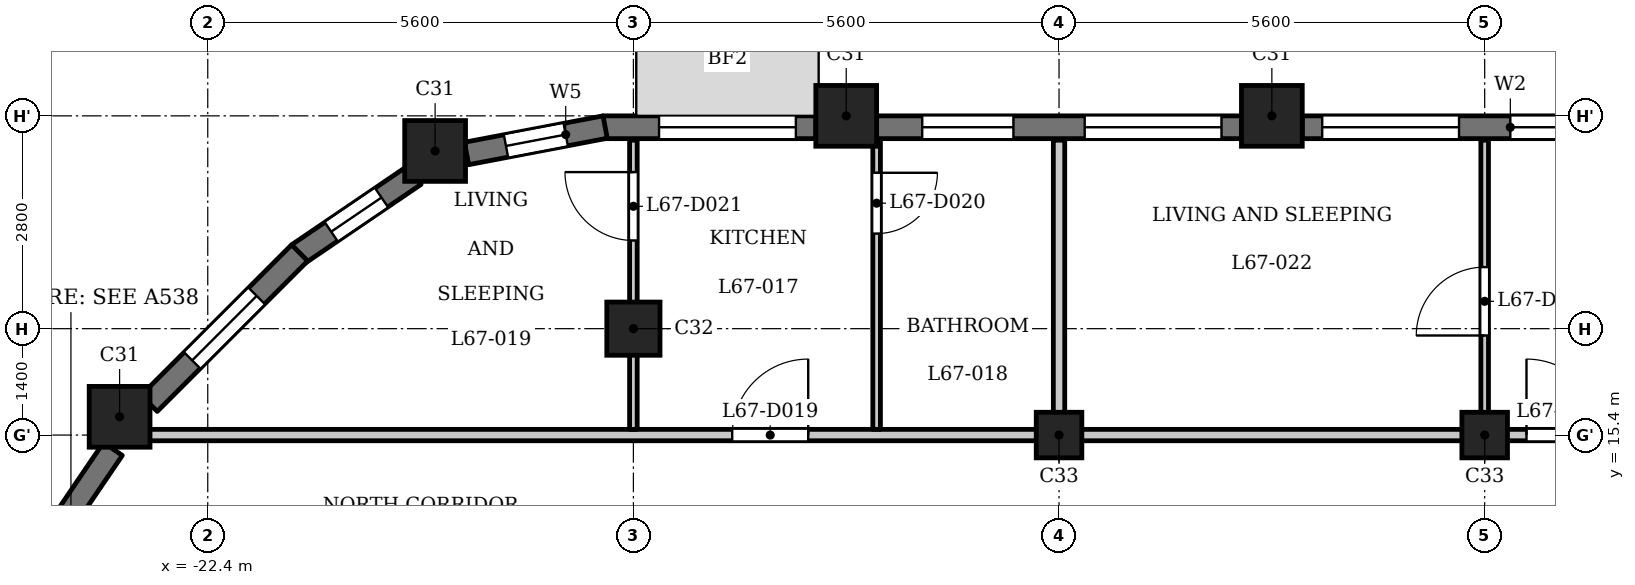
"""IFC4 building model, lengths in metres.
Left out: names, types, materials, properties, quantities, classifications, styles, units other than length and angle.
Written with IfcOpenShell. Run it as: python <this file> out.ifc"""

import sys

from ifc_helpers import new_model, si_unit, direction, frame, frame_2d, origin, origin_2d, place, context, subcontext, project, spatial, rectangle, extrude, element, fill, save


model = new_model("IFC4")
c1 = context("Model", 3, precision=1e-05, world=origin(), true_north=direction((0.0, 1.0)))
c2 = subcontext(c1, "Body", "Model", "MODEL_VIEW")
j1 = project(units=[si_unit("LENGTHUNIT", "METRE"), si_unit("PLANEANGLEUNIT", "RADIAN")], contexts=[c1])
p1 = place(None, origin())
s1 = spatial("IfcSite", under=j1, at=p1, CompositionType="ELEMENT")
p2 = place(p1, origin())
s2 = spatial("IfcBuilding", under=s1, at=p2, CompositionType="ELEMENT")
p3 = place(p2, frame((0.0, 0.0, 259.2)))
s3 = spatial("IfcBuildingStorey", under=s2, at=p3, CompositionType="ELEMENT", Elevation=259.2)
for number, where, z_axis, x_axis in (
    (1, (-8.4, 19.6, 0.0), (0.0, 0.0, 1.0), (1.0, 0.0, 0.0)),
    (2, (-14.0, 19.6, 0.0), (0.0, 0.0, 1.0), (1.0, 0.0, 0.0)),
    (3, (-19.409, 19.138, 0.0), (0.0, 0.0, 1.0), (1.0, 0.0, 0.0)),
    (4, (-23.56, 15.64, 0.0), (0.0, 0.0, 1.0), (1.0, 0.0, 0.0)),
):
    element("IfcColumn", number, at=place(p3, frame(where, z_axis=z_axis, x_axis=x_axis)), inside=s3, PredefinedType="COLUMN", context=c2, shape_type="SweptSolid", body=[
        extrude(rectangle(XDim=0.8, YDim=0.8, at=origin_2d()), origin(), (0.0, 0.0, 1.0), 3.5),
    ])
p4 = place(p3, frame((-16.8, 16.8, 0.0), z_axis=(0.0, 0.0, 1.0), x_axis=(1.0, 0.0, 0.0)))
e5 = element("IfcColumn", 5, at=p4, inside=s3, PredefinedType="COLUMN", context=c2, shape_type="SweptSolid", body=[
    extrude(rectangle(XDim=0.7, YDim=0.7, at=origin_2d()), origin(), (0.0, 0.0, 1.0), 3.5),
])
for number, where, z_axis, x_axis in (
    (6, (-11.2, 15.4, 0.0), (0.0, 0.0, 1.0), (1.0, 0.0, 0.0)),
    (7, (-5.6, 15.4, 0.0), (0.0, 0.0, 1.0), (1.0, 0.0, 0.0)),
):
    element("IfcColumn", number, at=place(p3, frame(where, z_axis=z_axis, x_axis=x_axis)), inside=s3, PredefinedType="COLUMN", context=c2, shape_type="SweptSolid", body=[
        extrude(rectangle(XDim=0.6, YDim=0.6, at=origin_2d()), origin(), (0.0, 0.0, 1.0), 3.5),
    ])
p5 = place(p3, frame((-3.2, 19.45, 0.0), z_axis=(0.0, 0.0, 1.0), x_axis=(-1.0, 0.0, 0.0)))
e8 = element("IfcWall", 8, at=p5, inside=s3, PredefinedType="SOLIDWALL", context=c2, shape_type="SweptSolid", body=[
    extrude(rectangle(XDim=4.8, YDim=0.3, at=frame_2d((2.4, 0.0))), origin(), (0.0, 0.0, 1.0), 2.55),
])
p6 = place(p5, frame((0.262, 0.0, 0.9)))
e9 = element("IfcOpeningElement", 9, at=p6, cuts=e8, PredefinedType="OPENING", context=c2, shape_type="SweptSolid", body=[
    extrude(rectangle(XDim=1.8, YDim=1.25, at=frame_2d((0.9, 0.625))), frame((0.0, 0.16, 0.0), z_axis=(0.0, -1.0, 0.0), x_axis=(1.0, 0.0, 0.0)), (0.0, 0.0, 1.0), 0.32),
])
p7 = place(p5, frame((2.738, 0.0, 0.9)))
e10 = element("IfcOpeningElement", 10, at=p7, cuts=e8, PredefinedType="OPENING", context=c2, shape_type="SweptSolid", body=[
    extrude(rectangle(XDim=1.8, YDim=1.25, at=frame_2d((0.9, 0.625))), frame((0.0, 0.16, 0.0), z_axis=(0.0, -1.0, 0.0), x_axis=(1.0, 0.0, 0.0)), (0.0, 0.0, 1.0), 0.32),
])
p8 = place(p3, frame((-8.8, 19.45, 0.0), z_axis=(0.0, 0.0, 1.0), x_axis=(-1.0, 0.0, 0.0)))
e11 = element("IfcWall", 11, at=p8, inside=s3, PredefinedType="SOLIDWALL", context=c2, shape_type="SweptSolid", body=[
    extrude(rectangle(XDim=4.8, YDim=0.3, at=frame_2d((2.4, 0.0))), origin(), (0.0, 0.0, 1.0), 2.55),
])
p9 = place(p8, frame((0.262, 0.0, 0.9)))
e12 = element("IfcOpeningElement", 12, at=p9, cuts=e11, PredefinedType="OPENING", context=c2, shape_type="SweptSolid", body=[
    extrude(rectangle(XDim=1.8, YDim=1.25, at=frame_2d((0.9, 0.625))), frame((0.0, 0.16, 0.0), z_axis=(0.0, -1.0, 0.0), x_axis=(1.0, 0.0, 0.0)), (0.0, 0.0, 1.0), 0.32),
])
p10 = place(p8, frame((3.0, 0.0, 0.6)))
e13 = element("IfcOpeningElement", 13, at=p10, cuts=e11, PredefinedType="OPENING", context=c2, shape_type="SweptSolid", body=[
    extrude(rectangle(XDim=1.2, YDim=1.55, at=frame_2d((0.6, 0.775))), frame((0.0, 0.16, 0.0), z_axis=(0.0, -1.0, 0.0), x_axis=(1.0, 0.0, 0.0)), (0.0, 0.0, 1.0), 0.32),
])
p11 = place(p3, frame((-14.4, 19.45, 0.0), z_axis=(0.0, 0.0, 1.0), x_axis=(-1.0, 0.0, 0.0)))
e14 = element("IfcWall", 14, at=p11, inside=s3, PredefinedType="SOLIDWALL", context=c2, shape_type="SweptSolid", body=[
    extrude(rectangle(XDim=2.8, YDim=0.3, at=frame_2d((1.4, 0.0))), origin(), (0.0, 0.0, 1.0), 2.55),
])
p12 = place(p11, frame((0.262, 0.0, 0.9)))
e15 = element("IfcOpeningElement", 15, at=p12, cuts=e14, PredefinedType="OPENING", context=c2, shape_type="SweptSolid", body=[
    extrude(rectangle(XDim=1.8, YDim=1.25, at=frame_2d((0.9, 0.625))), frame((0.0, 0.16, 0.0), z_axis=(0.0, -1.0, 0.0), x_axis=(1.0, 0.0, 0.0)), (0.0, 0.0, 1.0), 0.32),
])
p13 = place(p3, frame((-17.172, 19.453, 0.0), z_axis=(0.0, 0.0, 1.0), x_axis=(-0.982301706131, -0.187305520826, 0.0)))
e16 = element("IfcWall", 16, at=p13, inside=s3, PredefinedType="SOLIDWALL", context=c2, shape_type="SweptSolid", body=[
    extrude(rectangle(XDim=1.856, YDim=0.3, at=frame_2d((0.928, 0.0))), origin(), (0.0, 0.0, 1.0), 2.55),
])
p14 = place(p13, frame((0.528, 0.0, 0.6)))
e17 = element("IfcOpeningElement", 17, at=p14, cuts=e16, PredefinedType="OPENING", context=c2, shape_type="SweptSolid", body=[
    extrude(rectangle(XDim=0.8, YDim=1.55, at=frame_2d((0.4, 0.775))), frame((0.0, 0.16, 0.0), z_axis=(0.0, -1.0, 0.0), x_axis=(1.0, 0.0, 0.0)), (0.0, 0.0, 1.0), 0.32),
])
p15 = place(p3, frame((-19.678, 18.822, 0.0), z_axis=(0.0, 0.0, 1.0), x_axis=(-0.826997446962, -0.562205676526, 0.0)))
e18 = element("IfcWall", 18, at=p15, inside=s3, PredefinedType="SOLIDWALL", context=c2, shape_type="SweptSolid", body=[
    extrude(rectangle(XDim=1.856, YDim=0.3, at=frame_2d((0.928, 0.0))), origin(), (0.0, 0.0, 1.0), 2.55),
])
p16 = place(p15, frame((0.528, 0.0, 0.6)))
e19 = element("IfcOpeningElement", 19, at=p16, cuts=e18, PredefinedType="OPENING", context=c2, shape_type="SweptSolid", body=[
    extrude(rectangle(XDim=0.8, YDim=1.55, at=frame_2d((0.4, 0.775))), frame((0.0, 0.16, 0.0), z_axis=(0.0, -1.0, 0.0), x_axis=(1.0, 0.0, 0.0)), (0.0, 0.0, 1.0), 0.32),
])
p17 = place(p3, frame((-21.191, 17.797, 0.0), z_axis=(0.0, 0.0, 1.0), x_axis=(-0.707106781187, -0.707106781187, 0.0)))
e20 = element("IfcWall", 20, at=p17, inside=s3, PredefinedType="SOLIDWALL", context=c2, shape_type="SweptSolid", body=[
    extrude(rectangle(XDim=2.8, YDim=0.3, at=frame_2d((1.4, 0.0))), origin(), (0.0, 0.0, 1.0), 2.55),
])
p18 = place(p17, frame((0.8, 0.0, 0.6)))
e21 = element("IfcOpeningElement", 21, at=p18, cuts=e20, PredefinedType="OPENING", context=c2, shape_type="SweptSolid", body=[
    extrude(rectangle(XDim=1.2, YDim=1.55, at=frame_2d((0.6, 0.775))), frame((0.0, 0.16, 0.0), z_axis=(0.0, -1.0, 0.0), x_axis=(1.0, 0.0, 0.0)), (0.0, 0.0, 1.0), 0.32),
])
p19 = place(p3, frame((-23.648, 15.217, 0.0), z_axis=(0.0, 0.0, 1.0), x_axis=(-0.562043265151, -0.827107833416, 0.0)))
e22 = element("IfcWall", 22, at=p19, inside=s3, PredefinedType="SOLIDWALL", context=c2, shape_type="SweptSolid", body=[
    extrude(rectangle(XDim=1.377, YDim=0.3, at=frame_2d((0.688, 0.0))), origin(), (0.0, 0.0, 1.0), 2.55),
])
p20 = place(p3, frame((-23.55, 15.4, 0.0), z_axis=(0.0, 0.0, 1.0), x_axis=(1.0, 0.0, 0.0)))
e23 = element("IfcWall", 23, at=p20, inside=s3, PredefinedType="PARTITIONING", context=c2, shape_type="SweptSolid", body=[
    extrude(rectangle(XDim=46.872, YDim=0.15, at=frame_2d((23.436, 0.0))), origin(), (0.0, 0.0, 1.0), 3.2),
])
p21 = place(p20, frame((8.05, 0.0, 0.0)))
e24 = element("IfcOpeningElement", 24, at=p21, cuts=e23, PredefinedType="OPENING", context=c2, shape_type="SweptSolid", body=[
    extrude(rectangle(XDim=1.0, YDim=2.1, at=frame_2d((0.5, 1.05))), frame((0.0, 0.085, 0.0), z_axis=(0.0, -1.0, 0.0), x_axis=(1.0, 0.0, 0.0)), (0.0, 0.0, 1.0), 0.17),
])
p22 = place(p20, frame((18.5, 0.0, 0.0)))
e25 = element("IfcOpeningElement", 25, at=p22, cuts=e23, PredefinedType="OPENING", context=c2, shape_type="SweptSolid", body=[
    extrude(rectangle(XDim=1.0, YDim=2.1, at=frame_2d((0.5, 1.05))), frame((0.0, 0.085, 0.0), z_axis=(0.0, -1.0, 0.0), x_axis=(1.0, 0.0, 0.0)), (0.0, 0.0, 1.0), 0.17),
])
p23 = place(p20, frame((30.7, 0.0, 0.0)))
e26 = element("IfcOpeningElement", 26, at=p23, cuts=e23, PredefinedType="OPENING", context=c2, shape_type="SweptSolid", body=[
    extrude(rectangle(XDim=1.0, YDim=2.1, at=frame_2d((0.5, 1.05))), frame((0.0, 0.085, 0.0), z_axis=(0.0, -1.0, 0.0), x_axis=(1.0, 0.0, 0.0)), (0.0, 0.0, 1.0), 0.17),
])
p24 = place(p20, frame((37.7, 0.0, 0.0)))
e27 = element("IfcOpeningElement", 27, at=p24, cuts=e23, PredefinedType="OPENING", context=c2, shape_type="SweptSolid", body=[
    extrude(rectangle(XDim=1.0, YDim=2.1, at=frame_2d((0.5, 1.05))), frame((0.0, 0.085, 0.0), z_axis=(0.0, -1.0, 0.0), x_axis=(1.0, 0.0, 0.0)), (0.0, 0.0, 1.0), 0.17),
])
p25 = place(p3, frame((-16.8, 15.475, 0.0), z_axis=(0.0, 0.0, 1.0), x_axis=(0.0, 1.0, 0.0)))
e28 = element("IfcWall", 28, at=p25, inside=s3, PredefinedType="PARTITIONING", context=c2, shape_type="SweptSolid", body=[
    extrude(rectangle(XDim=3.805, YDim=0.1, at=frame_2d((1.902, 0.0))), origin(), (0.0, 0.0, 1.0), 3.2),
])
p26 = place(p25, frame((2.485, 0.0, 0.0)))
e29 = element("IfcOpeningElement", 29, at=p26, cuts=e28, PredefinedType="OPENING", context=c2, shape_type="SweptSolid", body=[
    extrude(rectangle(XDim=0.9, YDim=2.1, at=frame_2d((0.45, 1.05))), frame((0.0, 0.06, 0.0), z_axis=(0.0, -1.0, 0.0), x_axis=(1.0, 0.0, 0.0)), (0.0, 0.0, 1.0), 0.12),
])
p27 = place(p3, frame((-13.6, 15.475, 0.0), z_axis=(0.0, 0.0, 1.0), x_axis=(0.0, 1.0, 0.0)))
e30 = element("IfcWall", 30, at=p27, inside=s3, PredefinedType="PARTITIONING", context=c2, shape_type="SweptSolid", body=[
    extrude(rectangle(XDim=3.805, YDim=0.1, at=frame_2d((1.902, 0.0))), origin(), (0.0, 0.0, 1.0), 3.2),
])
p28 = place(p27, frame((2.576, 0.0, 0.0)))
e31 = element("IfcOpeningElement", 31, at=p28, cuts=e30, PredefinedType="OPENING", context=c2, shape_type="SweptSolid", body=[
    extrude(rectangle(XDim=0.8, YDim=2.1, at=frame_2d((0.4, 1.05))), frame((0.0, 0.06, 0.0), z_axis=(0.0, -1.0, 0.0), x_axis=(1.0, 0.0, 0.0)), (0.0, 0.0, 1.0), 0.12),
])
p29 = place(p3, frame((-11.2, 15.475, 0.0), z_axis=(0.0, 0.0, 1.0), x_axis=(0.0, 1.0, 0.0)))
e32 = element("IfcWall", 32, at=p29, inside=s3, PredefinedType="PARTITIONING", context=c2, shape_type="SweptSolid", body=[
    extrude(rectangle(XDim=3.805, YDim=0.15, at=frame_2d((1.902, 0.0))), origin(), (0.0, 0.0, 1.0), 3.2),
])
p30 = place(p3, frame((-5.6, 15.475, 0.0), z_axis=(0.0, 0.0, 1.0), x_axis=(0.0, 1.0, 0.0)))
e33 = element("IfcWall", 33, at=p30, inside=s3, PredefinedType="PARTITIONING", context=c2, shape_type="SweptSolid", body=[
    extrude(rectangle(XDim=3.805, YDim=0.1, at=frame_2d((1.902, 0.0))), origin(), (0.0, 0.0, 1.0), 3.2),
])
p31 = place(p30, frame((1.235, 0.0, 0.0)))
e34 = element("IfcOpeningElement", 34, at=p31, cuts=e33, PredefinedType="OPENING", context=c2, shape_type="SweptSolid", body=[
    extrude(rectangle(XDim=0.9, YDim=2.1, at=frame_2d((0.45, 1.05))), frame((0.0, 0.06, 0.0), z_axis=(0.0, -1.0, 0.0), x_axis=(1.0, 0.0, 0.0)), (0.0, 0.0, 1.0), 0.12),
])
p32 = place(p21, origin())
e35 = element("IfcDoor", 35, at=p32, inside=s3, OperationType="SINGLE_SWING_LEFT", PredefinedType="DOOR", context=c2, shape_type="SweptSolid", body=[
    extrude(rectangle(XDim=1.0, YDim=2.1, at=frame_2d((0.5, 1.05))), frame((0.0, 0.025, 0.0), z_axis=(0.0, -1.0, 0.0), x_axis=(1.0, 0.0, 0.0)), (0.0, 0.0, 1.0), 0.05),
])
fill(e24, e35)
p33 = place(p28, origin())
e36 = element("IfcDoor", 36, at=p33, inside=s3, OperationType="SINGLE_SWING_RIGHT", PredefinedType="DOOR", context=c2, shape_type="SweptSolid", body=[
    extrude(rectangle(XDim=0.8, YDim=2.1, at=frame_2d((0.4, 1.05))), frame((0.0, 0.025, 0.0), z_axis=(0.0, -1.0, 0.0), x_axis=(1.0, 0.0, 0.0)), (0.0, 0.0, 1.0), 0.05),
])
fill(e31, e36)
p34 = place(p26, origin())
e37 = element("IfcDoor", 37, at=p34, inside=s3, OperationType="SINGLE_SWING_LEFT", PredefinedType="DOOR", context=c2, shape_type="SweptSolid", body=[
    extrude(rectangle(XDim=0.9, YDim=2.1, at=frame_2d((0.45, 1.05))), frame((0.0, 0.025, 0.0), z_axis=(0.0, -1.0, 0.0), x_axis=(1.0, 0.0, 0.0)), (0.0, 0.0, 1.0), 0.05),
])
fill(e29, e37)
p35 = place(p22, origin())
e38 = element("IfcDoor", 38, at=p35, inside=s3, OperationType="SINGLE_SWING_RIGHT", PredefinedType="DOOR", context=c2, shape_type="SweptSolid", body=[
    extrude(rectangle(XDim=1.0, YDim=2.1, at=frame_2d((0.5, 1.05))), frame((0.0, 0.025, 0.0), z_axis=(0.0, -1.0, 0.0), x_axis=(1.0, 0.0, 0.0)), (0.0, 0.0, 1.0), 0.05),
])
fill(e25, e38)
p36 = place(p31, origin())
e39 = element("IfcDoor", 39, at=p36, inside=s3, OperationType="SINGLE_SWING_RIGHT", PredefinedType="DOOR", context=c2, shape_type="SweptSolid", body=[
    extrude(rectangle(XDim=0.9, YDim=2.1, at=frame_2d((0.45, 1.05))), frame((0.0, 0.025, 0.0), z_axis=(0.0, -1.0, 0.0), x_axis=(1.0, 0.0, 0.0)), (0.0, 0.0, 1.0), 0.05),
])
fill(e34, e39)
p37 = place(p6, origin())
e40 = element("IfcWindow", 40, at=p37, inside=s3, PartitioningType="SINGLE_PANEL", PredefinedType="WINDOW", context=c2, shape_type="SweptSolid", body=[
    extrude(rectangle(XDim=1.8, YDim=1.25, at=frame_2d((0.9, 0.625))), frame((0.0, 0.03, 0.0), z_axis=(0.0, -1.0, 0.0), x_axis=(1.0, 0.0, 0.0)), (0.0, 0.0, 1.0), 0.06),
])
fill(e9, e40)
p38 = place(p7, origin())
e41 = element("IfcWindow", 41, at=p38, inside=s3, PartitioningType="SINGLE_PANEL", PredefinedType="WINDOW", context=c2, shape_type="SweptSolid", body=[
    extrude(rectangle(XDim=1.8, YDim=1.25, at=frame_2d((0.9, 0.625))), frame((0.0, 0.03, 0.0), z_axis=(0.0, -1.0, 0.0), x_axis=(1.0, 0.0, 0.0)), (0.0, 0.0, 1.0), 0.06),
])
fill(e10, e41)
p39 = place(p9, origin())
e42 = element("IfcWindow", 42, at=p39, inside=s3, PartitioningType="SINGLE_PANEL", PredefinedType="WINDOW", context=c2, shape_type="SweptSolid", body=[
    extrude(rectangle(XDim=1.8, YDim=1.25, at=frame_2d((0.9, 0.625))), frame((0.0, 0.03, 0.0), z_axis=(0.0, -1.0, 0.0), x_axis=(1.0, 0.0, 0.0)), (0.0, 0.0, 1.0), 0.06),
])
fill(e12, e42)
p40 = place(p10, origin())
e43 = element("IfcWindow", 43, at=p40, inside=s3, PartitioningType="SINGLE_PANEL", PredefinedType="WINDOW", context=c2, shape_type="SweptSolid", body=[
    extrude(rectangle(XDim=1.2, YDim=1.55, at=frame_2d((0.6, 0.775))), frame((0.0, 0.03, 0.0), z_axis=(0.0, -1.0, 0.0), x_axis=(1.0, 0.0, 0.0)), (0.0, 0.0, 1.0), 0.06),
])
fill(e13, e43)
p41 = place(p12, origin())
e44 = element("IfcWindow", 44, at=p41, inside=s3, PartitioningType="SINGLE_PANEL", PredefinedType="WINDOW", context=c2, shape_type="SweptSolid", body=[
    extrude(rectangle(XDim=1.8, YDim=1.25, at=frame_2d((0.9, 0.625))), frame((0.0, 0.03, 0.0), z_axis=(0.0, -1.0, 0.0), x_axis=(1.0, 0.0, 0.0)), (0.0, 0.0, 1.0), 0.06),
])
fill(e15, e44)
p42 = place(p14, origin())
e45 = element("IfcWindow", 45, at=p42, inside=s3, PartitioningType="SINGLE_PANEL", PredefinedType="WINDOW", context=c2, shape_type="SweptSolid", body=[
    extrude(rectangle(XDim=0.8, YDim=1.55, at=frame_2d((0.4, 0.775))), frame((0.0, 0.03, 0.0), z_axis=(0.0, -1.0, 0.0), x_axis=(1.0, 0.0, 0.0)), (0.0, 0.0, 1.0), 0.06),
])
fill(e17, e45)
p43 = place(p16, origin())
e46 = element("IfcWindow", 46, at=p43, inside=s3, PartitioningType="SINGLE_PANEL", PredefinedType="WINDOW", context=c2, shape_type="SweptSolid", body=[
    extrude(rectangle(XDim=0.8, YDim=1.55, at=frame_2d((0.4, 0.775))), frame((0.0, 0.03, 0.0), z_axis=(0.0, -1.0, 0.0), x_axis=(1.0, 0.0, 0.0)), (0.0, 0.0, 1.0), 0.06),
])
fill(e19, e46)
p44 = place(p18, origin())
e47 = element("IfcWindow", 47, at=p44, inside=s3, PartitioningType="SINGLE_PANEL", PredefinedType="WINDOW", context=c2, shape_type="SweptSolid", body=[
    extrude(rectangle(XDim=1.2, YDim=1.55, at=frame_2d((0.6, 0.775))), frame((0.0, 0.03, 0.0), z_axis=(0.0, -1.0, 0.0), x_axis=(1.0, 0.0, 0.0)), (0.0, 0.0, 1.0), 0.06),
])
fill(e21, e47)
save(model, sys.argv[1])
